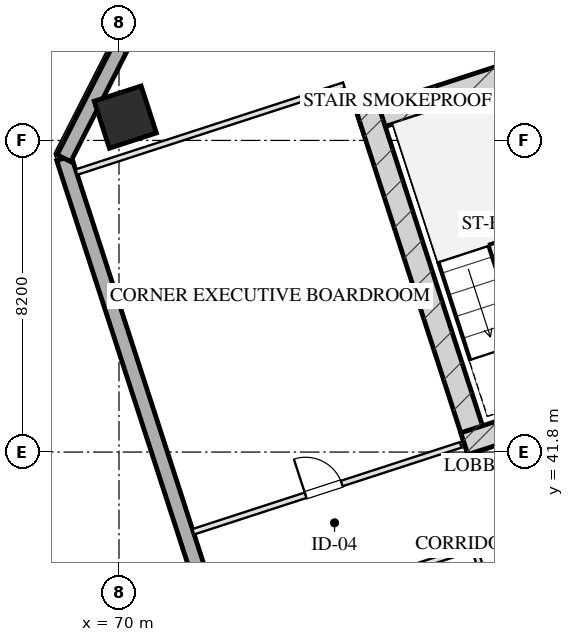
"""IFC4 building model, lengths in metres.
Left out: names, types, materials, properties, quantities, classifications, styles, units other than length and angle.
Written with IfcOpenShell. Run it as: python <this file> out.ifc"""

import sys

from ifc_helpers import new_model, si_unit, direction, frame, frame_2d, origin, origin_2d, place, context, subcontext, project, spatial, rectangle, hollow_rectangle, extrude, element, fill, save


model = new_model("IFC4")
c1 = context("Model", 3, precision=1e-05, world=origin(), true_north=direction((0.0, 1.0)))
c2 = subcontext(c1, "Body", "Model", "MODEL_VIEW")
j1 = project(units=[si_unit("LENGTHUNIT", "METRE"), si_unit("PLANEANGLEUNIT", "RADIAN")], contexts=[c1])
p1 = place(None, origin())
s1 = spatial("IfcSite", under=j1, at=p1, CompositionType="ELEMENT")
p2 = place(p1, origin())
s2 = spatial("IfcBuilding", under=s1, at=p2, CompositionType="ELEMENT")
p3 = place(p2, frame((0.0, 0.0, 166.75)))
s3 = spatial("IfcBuildingStorey", under=s2, at=p3, CompositionType="ELEMENT", Elevation=166.75)
p4 = place(p3, frame((76.344, 50.466, 0.0), z_axis=(0.0, 0.0, 1.0), x_axis=(0.951055727519, 0.309019421968, 0.0)))
e1 = element("IfcWall", 1, at=p4, inside=s3, PredefinedType="SHEAR", context=c2, shape_type="SweptSolid", body=[
    extrude(rectangle(XDim=16.4, YDim=0.6, at=frame_2d((8.2, 0.0))), origin(), (0.0, 0.0, 1.0), 3.45),
])
p5 = place(p3, frame((79.466, 41.828, 0.0), z_axis=(0.0, 0.0, 1.0), x_axis=(-0.309041232772, 0.951048640421, 0.0)))
e2 = element("IfcWall", 2, at=p5, inside=s3, PredefinedType="SHEAR", context=c2, shape_type="SweptSolid", body=[
    extrude(rectangle(XDim=9.48, YDim=0.6, at=frame_2d((4.74, 0.0))), origin(), (0.0, 0.0, 1.0), 3.45),
])
p6 = place(p3, frame((79.087, 42.021, 0.0), z_axis=(0.0, 0.0, 1.0), x_axis=(0.951062550203, 0.3089984233, 0.0)))
e3 = element("IfcWall", 3, at=p6, inside=s3, PredefinedType="SHEAR", context=c2, shape_type="SweptSolid", body=[
    extrude(rectangle(XDim=4.22, YDim=0.6, at=frame_2d((2.11, 0.0))), origin(), (0.0, 0.0, 1.0), 3.45),
])
p7 = place(p3, frame((70.165, 50.614, 0.0), z_axis=(0.0, 0.0, 1.0), x_axis=(0.951056516295, 0.309016994375, 0.0)))
e4 = element("IfcColumn", 4, at=p7, inside=s3, PredefinedType="COLUMN", context=c2, shape_type="SweptSolid", body=[
    extrude(hollow_rectangle(XDim=1.3, YDim=1.3, WallThickness=0.045, at=origin_2d()), origin(), (0.0, 0.0, 1.0), 3.451),
])
p8 = place(p3, frame((81.776, 8.827, 0.0), z_axis=(0.0, 0.0, 1.0), x_axis=(-0.309014228706, 0.951057414911, 0.0)))
e5 = element("IfcWall", 5, at=p8, inside=s3, PredefinedType="SOLIDWALL", context=c2, shape_type="SweptSolid", body=[
    extrude(rectangle(XDim=42.8, YDim=0.4, at=frame_2d((21.4, 0.0))), origin(), (0.0, 0.0, 1.0), 2.61),
])
p9 = place(p8, frame((17.75, 0.0, 0.0)))
e6 = element("IfcOpeningElement", 6, at=p9, cuts=e5, PredefinedType="OPENING", context=c2, shape_type="SweptSolid", body=[
    extrude(rectangle(XDim=1.1, YDim=2.15, at=frame_2d((0.55, 1.075))), frame((0.0, 0.21, 0.0), z_axis=(0.0, -1.0, 0.0), x_axis=(1.0, 0.0, 0.0)), (0.0, 0.0, 1.0), 0.42),
])
p10 = place(p3, frame((68.551, 49.532, 0.0), z_axis=(0.0, 0.0, 1.0), x_axis=(0.454019523198, 0.890991735402, 0.0)))
e7 = element("IfcWall", 7, at=p10, inside=s3, PredefinedType="SOLIDWALL", context=c2, shape_type="SweptSolid", body=[
    extrude(rectangle(XDim=3.394, YDim=0.4, at=frame_2d((1.697, 0.0))), origin(), (0.0, 0.0, 1.0), 2.61),
])
p11 = place(p3, frame((68.88, 49.166, 0.0), z_axis=(0.0, 0.0, 1.0), x_axis=(0.951060977215, 0.309003264738, 0.0)))
e8 = element("IfcWall", 8, at=p11, inside=s3, PredefinedType="PARTITIONING", context=c2, shape_type="SweptSolid", body=[
    extrude(rectangle(XDim=7.4, YDim=0.15, at=frame_2d((3.7, 0.0))), origin(), (0.0, 0.0, 1.0), 3.175),
])
p12 = place(p3, frame((71.955, 39.703, 0.0), z_axis=(0.0, 0.0, 1.0), x_axis=(0.951060977215, 0.309003264738, 0.0)))
e9 = element("IfcWall", 9, at=p12, inside=s3, PredefinedType="PARTITIONING", context=c2, shape_type="SweptSolid", body=[
    extrude(rectangle(XDim=7.4, YDim=0.15, at=frame_2d((3.7, 0.0))), origin(), (0.0, 0.0, 1.0), 3.175),
])
p13 = place(p12, frame((3.108, 0.0, 0.0)))
e10 = element("IfcOpeningElement", 10, at=p13, cuts=e9, PredefinedType="OPENING", context=c2, shape_type="SweptSolid", body=[
    extrude(rectangle(XDim=1.0, YDim=2.05, at=frame_2d((0.5, 1.025))), frame((0.0, 0.085, 0.0), z_axis=(0.0, -1.0, 0.0), x_axis=(1.0, 0.0, 0.0)), (0.0, 0.0, 1.0), 0.17),
])
p14 = place(p3, frame((72.783, 37.154, 0.0), z_axis=(0.0, 0.0, 1.0), x_axis=(0.951051488548, 0.309032467762, 0.0)))
e11 = element("IfcWall", 11, at=p14, inside=s3, PredefinedType="PARTITIONING", context=c2, shape_type="SweptSolid", body=[
    extrude(rectangle(XDim=6.9, YDim=0.15, at=frame_2d((3.45, 0.0))), origin(), (0.0, 0.0, 1.0), 3.175),
])
p15 = place(p3, frame((84.487, 23.46, 0.0), z_axis=(0.0, 0.0, 1.0), x_axis=(-0.30901773025, 0.951056277195, 0.0)))
e12 = element("IfcWall", 12, at=p15, inside=s3, PredefinedType="PARTITIONING", context=c2, shape_type="SweptSolid", body=[
    extrude(rectangle(XDim=16.64, YDim=0.15, at=frame_2d((8.32, 0.0))), origin(), (0.0, 0.0, 1.0), 3.175),
])
p16 = place(p15, frame((1.16, 0.0, 0.0)))
e13 = element("IfcOpeningElement", 13, at=p16, cuts=e12, PredefinedType="OPENING", context=c2, shape_type="SweptSolid", body=[
    extrude(rectangle(XDim=1.0, YDim=2.05, at=frame_2d((0.5, 1.025))), frame((0.0, 0.085, 0.0), z_axis=(0.0, -1.0, 0.0), x_axis=(1.0, 0.0, 0.0)), (0.0, 0.0, 1.0), 0.17),
])
p17 = place(p15, frame((4.72, 0.0, 0.0)))
e14 = element("IfcOpeningElement", 14, at=p17, cuts=e12, PredefinedType="OPENING", context=c2, shape_type="SweptSolid", body=[
    extrude(rectangle(XDim=1.05, YDim=2.05, at=frame_2d((0.525, 1.025))), frame((0.0, 0.085, 0.0), z_axis=(0.0, -1.0, 0.0), x_axis=(1.0, 0.0, 0.0)), (0.0, 0.0, 1.0), 0.17),
])
p18 = place(p15, frame((7.56, 0.0, 0.0)))
e15 = element("IfcOpeningElement", 15, at=p18, cuts=e12, PredefinedType="OPENING", context=c2, shape_type="SweptSolid", body=[
    extrude(rectangle(XDim=1.0, YDim=2.05, at=frame_2d((0.5, 1.025))), frame((0.0, 0.085, 0.0), z_axis=(0.0, -1.0, 0.0), x_axis=(1.0, 0.0, 0.0)), (0.0, 0.0, 1.0), 0.17),
])
p19 = place(p15, frame((10.16, 0.0, 0.0)))
e16 = element("IfcOpeningElement", 16, at=p19, cuts=e12, PredefinedType="OPENING", context=c2, shape_type="SweptSolid", body=[
    extrude(rectangle(XDim=1.0, YDim=2.05, at=frame_2d((0.5, 1.025))), frame((0.0, 0.085, 0.0), z_axis=(0.0, -1.0, 0.0), x_axis=(1.0, 0.0, 0.0)), (0.0, 0.0, 1.0), 0.17),
])
p20 = place(p15, frame((14.48, 0.0, 0.0)))
e17 = element("IfcOpeningElement", 17, at=p20, cuts=e12, PredefinedType="OPENING", context=c2, shape_type="SweptSolid", body=[
    extrude(rectangle(XDim=1.0, YDim=2.05, at=frame_2d((0.5, 1.025))), frame((0.0, 0.085, 0.0), z_axis=(0.0, -1.0, 0.0), x_axis=(1.0, 0.0, 0.0)), (0.0, 0.0, 1.0), 0.17),
])
p21 = place(p13, origin())
e18 = element("IfcDoor", 18, at=p21, inside=s3, OperationType="SINGLE_SWING_LEFT", PredefinedType="DOOR", context=c2, shape_type="SweptSolid", body=[
    extrude(rectangle(XDim=1.0, YDim=2.05, at=frame_2d((0.5, 1.025))), frame((0.0, 0.025, 0.0), z_axis=(0.0, -1.0, 0.0), x_axis=(1.0, 0.0, 0.0)), (0.0, 0.0, 1.0), 0.05),
])
fill(e10, e18)
save(model, sys.argv[1])
